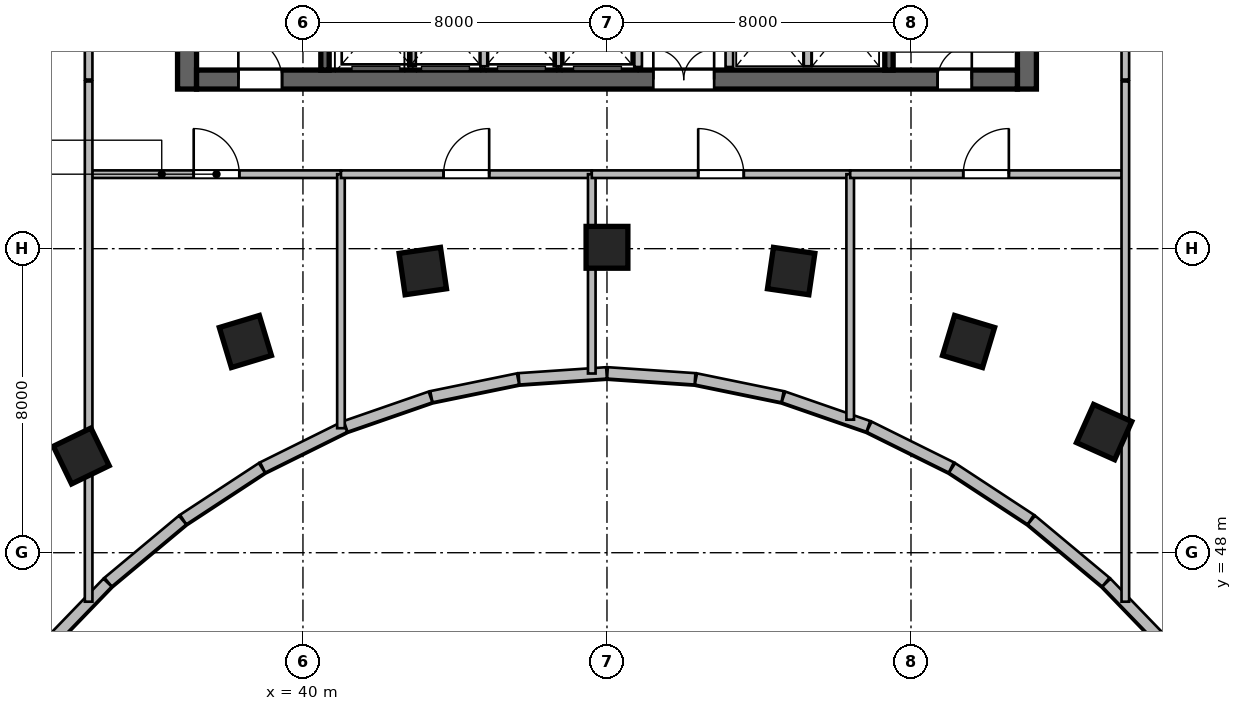
"""IFC4 building model, lengths in metres.
Left out: names, types, materials, properties, quantities, classifications, styles, units other than length and angle.
Written with IfcOpenShell. Run it as: python <this file> out.ifc"""

import sys

from ifc_helpers import new_model, si_unit, direction, frame, frame_2d, origin, origin_2d, place, context, subcontext, project, spatial, rectangle, extrude, source, transform, mapped, element, fill, save


model = new_model("IFC4")
c1 = context("Model", 3, precision=1e-05, world=origin(), true_north=direction((0.0, 1.0)))
c2 = subcontext(c1, "Body", "Model", "MODEL_VIEW")
j1 = project(units=[si_unit("LENGTHUNIT", "METRE"), si_unit("PLANEANGLEUNIT", "RADIAN")], contexts=[c1])
p1 = place(None, origin())
s1 = spatial("IfcSite", under=j1, at=p1, CompositionType="ELEMENT")
p2 = place(p1, origin())
s2 = spatial("IfcBuilding", under=s1, at=p2, CompositionType="ELEMENT")
p3 = place(p2, frame((0.0, 0.0, 85.8)))
s3 = spatial("IfcBuildingStorey", under=s2, at=p3, CompositionType="ELEMENT", Elevation=85.8)
m1 = source(origin(), c2, "Body", "SweptSolid", [
    extrude(rectangle(XDim=12.0, YDim=0.5, at=frame_2d((6.0, 0.0))), origin(), (0.0, 0.0, 1.0), 5.4),
])
for number, where, z_axis, x_axis in (
    (1, (36.95, 60.2, 0.0), (0.0, 0.0, 1.0), (0.0, 1.0, 0.0)),
    (2, (59.05, 60.2, 0.0), (0.0, 0.0, 1.0), (0.0, 1.0, 0.0)),
):
    element("IfcWall", number, at=place(p3, frame(where, z_axis=z_axis, x_axis=x_axis)), inside=s3, PredefinedType="SHEAR", context=c2, shape_type="MappedRepresentation", body=[
        mapped(m1, transform((0.0, 0.0, 0.0), scale=1.0)),
    ])
m2 = source(origin(), c2, "Body", "SweptSolid", [
    extrude(rectangle(XDim=21.6, YDim=0.5, at=frame_2d((10.8, 0.0))), origin(), (0.0, 0.0, 1.0), 5.4),
])
p4 = place(p3, frame((37.2, 60.45, 0.0), z_axis=(0.0, 0.0, 1.0), x_axis=(1.0, 0.0, 0.0)))
e3 = element("IfcWall", 3, at=p4, inside=s3, PredefinedType="SHEAR", context=c2, shape_type="MappedRepresentation", body=[
    mapped(m2, transform((0.0, 0.0, 0.0), scale=1.0)),
])
p5 = place(p4, frame((1.1, 0.0, 0.0)))
e4 = element("IfcOpeningElement", 4, at=p5, cuts=e3, PredefinedType="OPENING", context=c2, shape_type="SweptSolid", body=[
    extrude(rectangle(XDim=1.15, YDim=2.15, at=frame_2d((0.575, 1.075))), frame((0.0, 0.26, 0.0), z_axis=(0.0, -1.0, 0.0), x_axis=(1.0, 0.0, 0.0)), (0.0, 0.0, 1.0), 0.52),
])
p6 = place(p4, frame((19.5, 0.0, 0.0)))
e5 = element("IfcOpeningElement", 5, at=p6, cuts=e3, PredefinedType="OPENING", context=c2, shape_type="SweptSolid", body=[
    extrude(rectangle(XDim=0.9, YDim=2.1, at=frame_2d((0.45, 1.05))), frame((0.0, 0.26, 0.0), z_axis=(0.0, -1.0, 0.0), x_axis=(1.0, 0.0, 0.0)), (0.0, 0.0, 1.0), 0.52),
])
p7 = place(p4, frame((12.02, 0.0, 0.0)))
e6 = element("IfcOpeningElement", 6, at=p7, cuts=e3, PredefinedType="OPENING", context=c2, shape_type="SweptSolid", body=[
    extrude(rectangle(XDim=1.6, YDim=2.15, at=frame_2d((0.8, 1.075))), frame((0.0, 0.26, 0.0), z_axis=(0.0, -1.0, 0.0), x_axis=(1.0, 0.0, 0.0)), (0.0, 0.0, 1.0), 0.52),
])
m3 = source(origin(), c2, "Body", "SweptSolid", [
    extrude(rectangle(XDim=11.0, YDim=0.22, at=frame_2d((5.5, 0.0))), origin(), (0.0, 0.0, 1.0), 5.4),
])
p8 = place(p3, frame((40.58, 60.7, 0.0), z_axis=(0.0, 0.0, 1.0), x_axis=(0.0, 1.0, 0.0)))
e7 = element("IfcWall", 7, at=p8, inside=s3, PredefinedType="SHEAR", context=c2, shape_type="MappedRepresentation", body=[
    mapped(m3, transform((0.0, 0.0, 0.0), scale=1.0)),
])
p9 = place(p3, frame((55.42, 60.7, 0.0), z_axis=(0.0, 0.0, 1.0), x_axis=(0.0, 1.0, 0.0)))
e8 = element("IfcWall", 8, at=p9, inside=s3, PredefinedType="SHEAR", context=c2, shape_type="MappedRepresentation", body=[
    mapped(m3, transform((0.0, 0.0, 0.0), scale=1.0)),
])
p10 = place(p9, frame((9.545, 0.0, 0.0)))
e9 = element("IfcOpeningElement", 9, at=p10, cuts=e8, PredefinedType="OPENING", context=c2, shape_type="SweptSolid", body=[
    extrude(rectangle(XDim=1.15, YDim=2.15, at=frame_2d((0.575, 1.075))), frame((0.0, 0.12, 0.0), z_axis=(0.0, -1.0, 0.0), x_axis=(1.0, 0.0, 0.0)), (0.0, 0.0, 1.0), 0.24),
])
m4 = source(origin(), c2, "Body", "SweptSolid", [
    extrude(rectangle(XDim=1.1, YDim=1.1, at=origin_2d()), origin(), (0.0, 0.0, 1.0), 5.4),
])
for number, where, z_axis, x_axis in (
    (10, (34.166, 50.545, 0.0), (0.0, 0.0, 1.0), (-0.436, 0.9, 0.0)),
    (11, (38.485, 53.558, 0.0), (0.0, 0.0, 1.0), (-0.289, 0.957, 0.0)),
    (12, (43.154, 55.411, 0.0), (0.0, 0.0, 1.0), (-0.143, 0.99, 0.0)),
    (13, (48.0, 56.036, 0.0), (0.0, 0.0, 1.0), (0.0, 1.0, 0.0)),
    (14, (52.846, 55.411, 0.0), (0.0, 0.0, 1.0), (0.143, 0.99, 0.0)),
    (15, (57.515, 53.558, 0.0), (0.0, 0.0, 1.0), (0.289, 0.957, 0.0)),
    (16, (61.082, 51.175, 0.0), (0.0, 0.0, 1.0), (0.409, 0.912, 0.0)),
):
    element("IfcColumn", number, at=place(p3, frame(where, z_axis=z_axis, x_axis=x_axis)), inside=s3, PredefinedType="COLUMN", context=c2, shape_type="MappedRepresentation", body=[
        mapped(m4, transform((0.0, 0.0, 0.0), scale=1.0)),
    ])
m5 = source(origin(), c2, "Body", "SweptSolid", [
    extrude(rectangle(XDim=2.628, YDim=0.3, at=frame_2d((1.314, 0.0))), origin(), (0.0, 0.0, 1.0), 5.15),
])
p11 = place(p3, frame((62.967, 45.322, 0.0), z_axis=(0.0, 0.0, 1.0), x_axis=(-0.694596171565, 0.719399859917, 0.0)))
e17 = element("IfcWall", 17, at=p11, inside=s3, PredefinedType="SOLIDWALL", context=c2, shape_type="MappedRepresentation", body=[
    mapped(m5, transform((0.0, 0.0, 0.0), scale=1.0)),
])
m6 = source(origin(), c2, "Body", "SweptSolid", [
    extrude(rectangle(XDim=2.551, YDim=0.3, at=frame_2d((1.275, 0.0))), origin(), (0.0, 0.0, 1.0), 5.15),
])
p12 = place(p3, frame((61.128, 47.226, 0.0), z_axis=(0.0, 0.0, 1.0), x_axis=(-0.767977995995, 0.640476227247, 0.0)))
e18 = element("IfcWall", 18, at=p12, inside=s3, PredefinedType="SOLIDWALL", context=c2, shape_type="MappedRepresentation", body=[
    mapped(m6, transform((0.0, 0.0, 0.0), scale=1.0)),
])
m7 = source(origin(), c2, "Body", "SweptSolid", [
    extrude(rectangle(XDim=2.478, YDim=0.3, at=frame_2d((1.239, 0.0))), origin(), (0.0, 0.0, 1.0), 5.15),
])
p13 = place(p3, frame((59.153, 48.872, 0.0), z_axis=(0.0, 0.0, 1.0), x_axis=(-0.835954701048, 0.548798449156, 0.0)))
e19 = element("IfcWall", 19, at=p13, inside=s3, PredefinedType="SOLIDWALL", context=c2, shape_type="MappedRepresentation", body=[
    mapped(m7, transform((0.0, 0.0, 0.0), scale=1.0)),
])
m8 = source(origin(), c2, "Body", "SweptSolid", [
    extrude(rectangle(XDim=2.415, YDim=0.3, at=frame_2d((1.208, 0.0))), origin(), (0.0, 0.0, 1.0), 5.15),
])
p14 = place(p3, frame((57.062, 50.243, 0.0), z_axis=(0.0, 0.0, 1.0), x_axis=(-0.895978588606, 0.444097251466, 0.0)))
e20 = element("IfcWall", 20, at=p14, inside=s3, PredefinedType="SOLIDWALL", context=c2, shape_type="MappedRepresentation", body=[
    mapped(m8, transform((0.0, 0.0, 0.0), scale=1.0)),
])
m9 = source(origin(), c2, "Body", "SweptSolid", [
    extrude(rectangle(XDim=2.364, YDim=0.3, at=frame_2d((1.182, 0.0))), origin(), (0.0, 0.0, 1.0), 5.15),
])
p15 = place(p3, frame((54.877, 51.324, 0.0), z_axis=(0.0, 0.0, 1.0), x_axis=(-0.944877958415, 0.327422729359, 0.0)))
e21 = element("IfcWall", 21, at=p15, inside=s3, PredefinedType="SOLIDWALL", context=c2, shape_type="MappedRepresentation", body=[
    mapped(m9, transform((0.0, 0.0, 0.0), scale=1.0)),
])
m10 = source(origin(), c2, "Body", "SweptSolid", [
    extrude(rectangle(XDim=2.328, YDim=0.3, at=frame_2d((1.164, 0.0))), origin(), (0.0, 0.0, 1.0), 5.15),
])
p16 = place(p3, frame((52.621, 52.104, 0.0), z_axis=(0.0, 0.0, 1.0), x_axis=(-0.979604817867, 0.200933821971, 0.0)))
e22 = element("IfcWall", 22, at=p16, inside=s3, PredefinedType="SOLIDWALL", context=c2, shape_type="MappedRepresentation", body=[
    mapped(m10, transform((0.0, 0.0, 0.0), scale=1.0)),
])
m11 = source(origin(), c2, "Body", "SweptSolid", [
    extrude(rectangle(XDim=2.31, YDim=0.3, at=frame_2d((1.155, 0.0))), origin(), (0.0, 0.0, 1.0), 5.15),
])
for number, where, z_axis, x_axis in (
    (23, (50.316, 52.575, 0.0), (0.0, 0.0, 1.0), (-0.998, 0.068, 0.0)),
    (24, (47.988, 52.732, 0.0), (0.0, 0.0, 1.0), (-0.998, -0.068, 0.0)),
):
    element("IfcWall", number, at=place(p3, frame(where, z_axis=z_axis, x_axis=x_axis)), inside=s3, PredefinedType="SOLIDWALL", context=c2, shape_type="MappedRepresentation", body=[
        mapped(m11, transform((0.0, 0.0, 0.0), scale=1.0)),
    ])
p17 = place(p3, frame((45.66, 52.572, 0.0), z_axis=(0.0, 0.0, 1.0), x_axis=(-0.979604817867, -0.200933821971, 0.0)))
e25 = element("IfcWall", 25, at=p17, inside=s3, PredefinedType="SOLIDWALL", context=c2, shape_type="MappedRepresentation", body=[
    mapped(m10, transform((0.0, 0.0, 0.0), scale=1.0)),
])
p18 = place(p3, frame((43.356, 52.098, 0.0), z_axis=(0.0, 0.0, 1.0), x_axis=(-0.944877958415, -0.327422729359, 0.0)))
e26 = element("IfcWall", 26, at=p18, inside=s3, PredefinedType="SOLIDWALL", context=c2, shape_type="MappedRepresentation", body=[
    mapped(m9, transform((0.0, 0.0, 0.0), scale=1.0)),
])
p19 = place(p3, frame((41.102, 51.315, 0.0), z_axis=(0.0, 0.0, 1.0), x_axis=(-0.895978588606, -0.444097251466, 0.0)))
e27 = element("IfcWall", 27, at=p19, inside=s3, PredefinedType="SOLIDWALL", context=c2, shape_type="MappedRepresentation", body=[
    mapped(m8, transform((0.0, 0.0, 0.0), scale=1.0)),
])
p20 = place(p3, frame((38.919, 50.232, 0.0), z_axis=(0.0, 0.0, 1.0), x_axis=(-0.835954701048, -0.548798449156, 0.0)))
e28 = element("IfcWall", 28, at=p20, inside=s3, PredefinedType="SOLIDWALL", context=c2, shape_type="MappedRepresentation", body=[
    mapped(m7, transform((0.0, 0.0, 0.0), scale=1.0)),
])
p21 = place(p3, frame((36.831, 48.86, 0.0), z_axis=(0.0, 0.0, 1.0), x_axis=(-0.767977995995, -0.640476227247, 0.0)))
e29 = element("IfcWall", 29, at=p21, inside=s3, PredefinedType="SOLIDWALL", context=c2, shape_type="MappedRepresentation", body=[
    mapped(m6, transform((0.0, 0.0, 0.0), scale=1.0)),
])
p22 = place(p3, frame((34.858, 47.213, 0.0), z_axis=(0.0, 0.0, 1.0), x_axis=(-0.694596171565, -0.719399859917, 0.0)))
e30 = element("IfcWall", 30, at=p22, inside=s3, PredefinedType="SOLIDWALL", context=c2, shape_type="MappedRepresentation", body=[
    mapped(m5, transform((0.0, 0.0, 0.0), scale=1.0)),
])
m12 = source(origin(), c2, "Body", "SweptSolid", [
    extrude(rectangle(XDim=2.24, YDim=0.2, at=frame_2d((1.12, 0.0))), origin(), (0.0, 0.0, 1.0), 5.15),
])
for number, where, z_axis, x_axis in (
    (31, (48.82, 60.78, 0.0), (0.0, 0.0, 1.0), (0.0, 1.0, 0.0)),
    (32, (51.22, 60.78, 0.0), (0.0, 0.0, 1.0), (0.0, 1.0, 0.0)),
):
    element("IfcWall", number, at=place(p3, frame(where, z_axis=z_axis, x_axis=x_axis)), inside=s3, PredefinedType="SOLIDWALL", context=c2, shape_type="MappedRepresentation", body=[
        mapped(m12, transform((0.0, 0.0, 0.0), scale=1.0)),
    ])
m13 = source(origin(), c2, "Body", "SweptSolid", [
    extrude(rectangle(XDim=2.2, YDim=0.2, at=frame_2d((1.1, 0.0))), origin(), (0.0, 0.0, 1.0), 5.15),
])
for number, where, z_axis, x_axis in (
    (33, (42.87, 60.8, 0.0), (0.0, 0.0, 1.0), (0.0, 1.0, 0.0)),
    (34, (44.77, 60.8, 0.0), (0.0, 0.0, 1.0), (0.0, 1.0, 0.0)),
    (35, (46.7, 60.8, 0.0), (0.0, 0.0, 1.0), (0.0, 1.0, 0.0)),
    (36, (53.28, 60.8, 0.0), (0.0, 0.0, 1.0), (0.0, 1.0, 0.0)),
):
    element("IfcWall", number, at=place(p3, frame(where, z_axis=z_axis, x_axis=x_axis)), inside=s3, PredefinedType="SOLIDWALL", context=c2, shape_type="MappedRepresentation", body=[
        mapped(m13, transform((0.0, 0.0, 0.0), scale=1.0)),
    ])
m14 = source(origin(), c2, "Body", "SweptSolid", [
    extrude(rectangle(XDim=6.55, YDim=0.2, at=frame_2d((3.275, 0.0))), origin(), (0.0, 0.0, 1.0), 5.15),
])
p23 = place(p3, frame((34.45, 57.96, 0.0), z_axis=(0.0, 0.0, 1.0), x_axis=(1.0, 0.0, 0.0)))
e37 = element("IfcWall", 37, at=p23, inside=s3, PredefinedType="SOLIDWALL", context=c2, shape_type="MappedRepresentation", body=[
    mapped(m14, transform((0.0, 0.0, 0.0), scale=1.0)),
])
p24 = place(p23, frame((2.675, 0.0, 0.0)))
e38 = element("IfcOpeningElement", 38, at=p24, cuts=e37, PredefinedType="OPENING", context=c2, shape_type="SweptSolid", body=[
    extrude(rectangle(XDim=1.2, YDim=2.15, at=frame_2d((0.6, 1.075))), frame((0.0, 0.11, 0.0), z_axis=(0.0, -1.0, 0.0), x_axis=(1.0, 0.0, 0.0)), (0.0, 0.0, 1.0), 0.22),
])
m15 = source(origin(), c2, "Body", "SweptSolid", [
    extrude(rectangle(XDim=6.684, YDim=0.2, at=frame_2d((3.342, 0.0))), origin(), (0.0, 0.0, 1.0), 5.15),
])
p25 = place(p3, frame((41.0, 51.276, 0.0), z_axis=(0.0, 0.0, 1.0), x_axis=(0.0, 1.0, 0.0)))
e39 = element("IfcWall", 39, at=p25, inside=s3, PredefinedType="SOLIDWALL", context=c2, shape_type="MappedRepresentation", body=[
    mapped(m15, transform((0.0, 0.0, 0.0), scale=1.0)),
])
m16 = source(origin(), c2, "Body", "SweptSolid", [
    extrude(rectangle(XDim=6.6, YDim=0.2, at=frame_2d((3.3, 0.0))), origin(), (0.0, 0.0, 1.0), 4.717),
])
p26 = place(p3, frame((41.0, 57.96, 0.0), z_axis=(0.0, 0.0, 1.0), x_axis=(1.0, 0.0, 0.0)))
e40 = element("IfcWall", 40, at=p26, inside=s3, PredefinedType="SOLIDWALL", context=c2, shape_type="MappedRepresentation", body=[
    mapped(m16, transform((0.0, 0.0, 0.0), scale=1.0)),
])
p27 = place(p26, frame((2.7, 0.0, 0.0)))
e41 = element("IfcOpeningElement", 41, at=p27, cuts=e40, PredefinedType="OPENING", context=c2, shape_type="SweptSolid", body=[
    extrude(rectangle(XDim=1.2, YDim=2.15, at=frame_2d((0.6, 1.075))), frame((0.0, 0.11, 0.0), z_axis=(0.0, -1.0, 0.0), x_axis=(1.0, 0.0, 0.0)), (0.0, 0.0, 1.0), 0.22),
])
m17 = source(origin(), c2, "Body", "SweptSolid", [
    extrude(rectangle(XDim=5.245, YDim=0.2, at=frame_2d((2.622, 0.0))), origin(), (0.0, 0.0, 1.0), 5.15),
])
p28 = place(p3, frame((47.6, 52.715, 0.0), z_axis=(0.0, 0.0, 1.0), x_axis=(0.0, 1.0, 0.0)))
e42 = element("IfcWall", 42, at=p28, inside=s3, PredefinedType="SOLIDWALL", context=c2, shape_type="MappedRepresentation", body=[
    mapped(m17, transform((0.0, 0.0, 0.0), scale=1.0)),
])
m18 = source(origin(), c2, "Body", "SweptSolid", [
    extrude(rectangle(XDim=6.8, YDim=0.2, at=frame_2d((3.4, 0.0))), origin(), (0.0, 0.0, 1.0), 4.717),
])
p29 = place(p3, frame((47.6, 57.96, 0.0), z_axis=(0.0, 0.0, 1.0), x_axis=(1.0, 0.0, 0.0)))
e43 = element("IfcWall", 43, at=p29, inside=s3, PredefinedType="SOLIDWALL", context=c2, shape_type="MappedRepresentation", body=[
    mapped(m18, transform((0.0, 0.0, 0.0), scale=1.0)),
])
p30 = place(p29, frame((2.8, 0.0, 0.0)))
e44 = element("IfcOpeningElement", 44, at=p30, cuts=e43, PredefinedType="OPENING", context=c2, shape_type="SweptSolid", body=[
    extrude(rectangle(XDim=1.2, YDim=2.15, at=frame_2d((0.6, 1.075))), frame((0.0, 0.11, 0.0), z_axis=(0.0, -1.0, 0.0), x_axis=(1.0, 0.0, 0.0)), (0.0, 0.0, 1.0), 0.22),
])
m19 = source(origin(), c2, "Body", "SweptSolid", [
    extrude(rectangle(XDim=6.46, YDim=0.2, at=frame_2d((3.23, 0.0))), origin(), (0.0, 0.0, 1.0), 5.15),
])
p31 = place(p3, frame((54.4, 51.5, 0.0), z_axis=(0.0, 0.0, 1.0), x_axis=(0.0, 1.0, 0.0)))
e45 = element("IfcWall", 45, at=p31, inside=s3, PredefinedType="SOLIDWALL", context=c2, shape_type="MappedRepresentation", body=[
    mapped(m19, transform((0.0, 0.0, 0.0), scale=1.0)),
])
m20 = source(origin(), c2, "Body", "SweptSolid", [
    extrude(rectangle(XDim=7.15, YDim=0.2, at=frame_2d((3.575, 0.0))), origin(), (0.0, 0.0, 1.0), 4.717),
])
p32 = place(p3, frame((54.4, 57.96, 0.0), z_axis=(0.0, 0.0, 1.0), x_axis=(1.0, 0.0, 0.0)))
e46 = element("IfcWall", 46, at=p32, inside=s3, PredefinedType="SOLIDWALL", context=c2, shape_type="MappedRepresentation", body=[
    mapped(m20, transform((0.0, 0.0, 0.0), scale=1.0)),
])
p33 = place(p32, frame((2.975, 0.0, 0.0)))
e47 = element("IfcOpeningElement", 47, at=p33, cuts=e46, PredefinedType="OPENING", context=c2, shape_type="SweptSolid", body=[
    extrude(rectangle(XDim=1.2, YDim=2.15, at=frame_2d((0.6, 1.075))), frame((0.0, 0.11, 0.0), z_axis=(0.0, -1.0, 0.0), x_axis=(1.0, 0.0, 0.0)), (0.0, 0.0, 1.0), 0.22),
])
m21 = source(origin(), c2, "Body", "SweptSolid", [
    extrude(rectangle(XDim=13.689, YDim=0.2, at=frame_2d((6.844, 0.0))), origin(), (0.0, 0.0, 1.0), 5.15),
])
p34 = place(p3, frame((34.36, 46.711, 0.0), z_axis=(0.0, 0.0, 1.0), x_axis=(0.0, 1.0, 0.0)))
e48 = element("IfcWall", 48, at=p34, inside=s3, PredefinedType="SOLIDWALL", context=c2, shape_type="MappedRepresentation", body=[
    mapped(m21, transform((0.0, 0.0, 0.0), scale=1.0)),
])
m22 = source(origin(), c2, "Body", "SweptSolid", [
    extrude(rectangle(XDim=5.05, YDim=0.2, at=frame_2d((2.525, 0.0))), origin(), (0.0, 0.0, 1.0), 5.15),
])
p35 = place(p3, frame((34.36, 60.45, 0.0), z_axis=(0.0, 0.0, 1.0), x_axis=(0.0, 1.0, 0.0)))
e49 = element("IfcWall", 49, at=p35, inside=s3, PredefinedType="SOLIDWALL", context=c2, shape_type="MappedRepresentation", body=[
    mapped(m22, transform((0.0, 0.0, 0.0), scale=1.0)),
])
p36 = place(p35, frame((1.875, 0.0, 0.0)))
e50 = element("IfcOpeningElement", 50, at=p36, cuts=e49, PredefinedType="OPENING", context=c2, shape_type="SweptSolid", body=[
    extrude(rectangle(XDim=1.3, YDim=2.15, at=frame_2d((0.65, 1.075))), frame((0.0, 0.11, 0.0), z_axis=(0.0, -1.0, 0.0), x_axis=(1.0, 0.0, 0.0)), (0.0, 0.0, 1.0), 0.22),
])
m23 = source(origin(), c2, "Body", "SweptSolid", [
    extrude(rectangle(XDim=13.689, YDim=0.2, at=frame_2d((6.844, 0.0))), origin(), (0.0, 0.0, 1.0), 4.434),
])
p37 = place(p3, frame((61.64, 46.711, 0.0), z_axis=(0.0, 0.0, 1.0), x_axis=(0.0, 1.0, 0.0)))
e51 = element("IfcWall", 51, at=p37, inside=s3, PredefinedType="SOLIDWALL", context=c2, shape_type="MappedRepresentation", body=[
    mapped(m23, transform((0.0, 0.0, 0.0), scale=1.0)),
])
p38 = place(p3, frame((61.64, 60.45, 0.0), z_axis=(0.0, 0.0, 1.0), x_axis=(0.0, 1.0, 0.0)))
e52 = element("IfcWall", 52, at=p38, inside=s3, PredefinedType="SOLIDWALL", context=c2, shape_type="MappedRepresentation", body=[
    mapped(m22, transform((0.0, 0.0, 0.0), scale=1.0)),
])
p39 = place(p38, frame((1.875, 0.0, 0.0)))
e53 = element("IfcOpeningElement", 53, at=p39, cuts=e52, PredefinedType="OPENING", context=c2, shape_type="SweptSolid", body=[
    extrude(rectangle(XDim=1.3, YDim=2.15, at=frame_2d((0.65, 1.075))), frame((0.0, 0.11, 0.0), z_axis=(0.0, -1.0, 0.0), x_axis=(1.0, 0.0, 0.0)), (0.0, 0.0, 1.0), 0.22),
])
m24 = source(origin(), c2, "Body", "SweptSolid", [
    extrude(rectangle(XDim=1.15, YDim=2.15, at=frame_2d((0.575, 1.075))), frame((0.0, 0.025, 0.0), z_axis=(0.0, -1.0, 0.0), x_axis=(1.0, 0.0, 0.0)), (0.0, 0.0, 1.0), 0.05),
])
p40 = place(p5, origin())
e54 = element("IfcDoor", 54, at=p40, inside=s3, OperationType="SINGLE_SWING_LEFT", PredefinedType="DOOR", context=c2, shape_type="MappedRepresentation", body=[
    mapped(m24, transform((0.0, 0.0, 0.0), scale=1.0)),
])
fill(e4, e54)
m25 = source(origin(), c2, "Body", "SweptSolid", [
    extrude(rectangle(XDim=0.9, YDim=2.1, at=frame_2d((0.45, 1.05))), frame((0.0, 0.025, 0.0), z_axis=(0.0, -1.0, 0.0), x_axis=(1.0, 0.0, 0.0)), (0.0, 0.0, 1.0), 0.05),
])
p41 = place(p6, origin())
e55 = element("IfcDoor", 55, at=p41, inside=s3, OperationType="SINGLE_SWING_RIGHT", PredefinedType="DOOR", context=c2, shape_type="MappedRepresentation", body=[
    mapped(m25, transform((0.0, 0.0, 0.0), scale=1.0)),
])
fill(e5, e55)
m26 = source(origin(), c2, "Body", "SweptSolid", [
    extrude(rectangle(XDim=1.6, YDim=2.15, at=frame_2d((0.8, 1.075))), frame((0.0, 0.025, 0.0), z_axis=(0.0, -1.0, 0.0), x_axis=(1.0, 0.0, 0.0)), (0.0, 0.0, 1.0), 0.05),
])
p42 = place(p7, origin())
e56 = element("IfcDoor", 56, at=p42, inside=s3, OperationType="DOUBLE_DOOR_SINGLE_SWING", PredefinedType="DOOR", context=c2, shape_type="MappedRepresentation", body=[
    mapped(m26, transform((0.0, 0.0, 0.0), scale=1.0)),
])
fill(e6, e56)
m27 = source(origin(), c2, "Body", "SweptSolid", [
    extrude(rectangle(XDim=1.2, YDim=2.15, at=frame_2d((0.6, 1.075))), frame((0.0, 0.025, 0.0), z_axis=(0.0, -1.0, 0.0), x_axis=(1.0, 0.0, 0.0)), (0.0, 0.0, 1.0), 0.05),
])
p43 = place(p24, origin())
e57 = element("IfcDoor", 57, at=p43, inside=s3, OperationType="SINGLE_SWING_LEFT", PredefinedType="DOOR", context=c2, shape_type="MappedRepresentation", body=[
    mapped(m27, transform((0.0, 0.0, 0.0), scale=1.0)),
])
fill(e38, e57)
p44 = place(p27, origin())
e58 = element("IfcDoor", 58, at=p44, inside=s3, OperationType="SINGLE_SWING_RIGHT", PredefinedType="DOOR", context=c2, shape_type="MappedRepresentation", body=[
    mapped(m27, transform((0.0, 0.0, 0.0), scale=1.0)),
])
fill(e41, e58)
p45 = place(p30, origin())
e59 = element("IfcDoor", 59, at=p45, inside=s3, OperationType="SINGLE_SWING_LEFT", PredefinedType="DOOR", context=c2, shape_type="MappedRepresentation", body=[
    mapped(m27, transform((0.0, 0.0, 0.0), scale=1.0)),
])
fill(e44, e59)
p46 = place(p33, origin())
e60 = element("IfcDoor", 60, at=p46, inside=s3, OperationType="SINGLE_SWING_RIGHT", PredefinedType="DOOR", context=c2, shape_type="MappedRepresentation", body=[
    mapped(m27, transform((0.0, 0.0, 0.0), scale=1.0)),
])
fill(e47, e60)
save(model, sys.argv[1])
